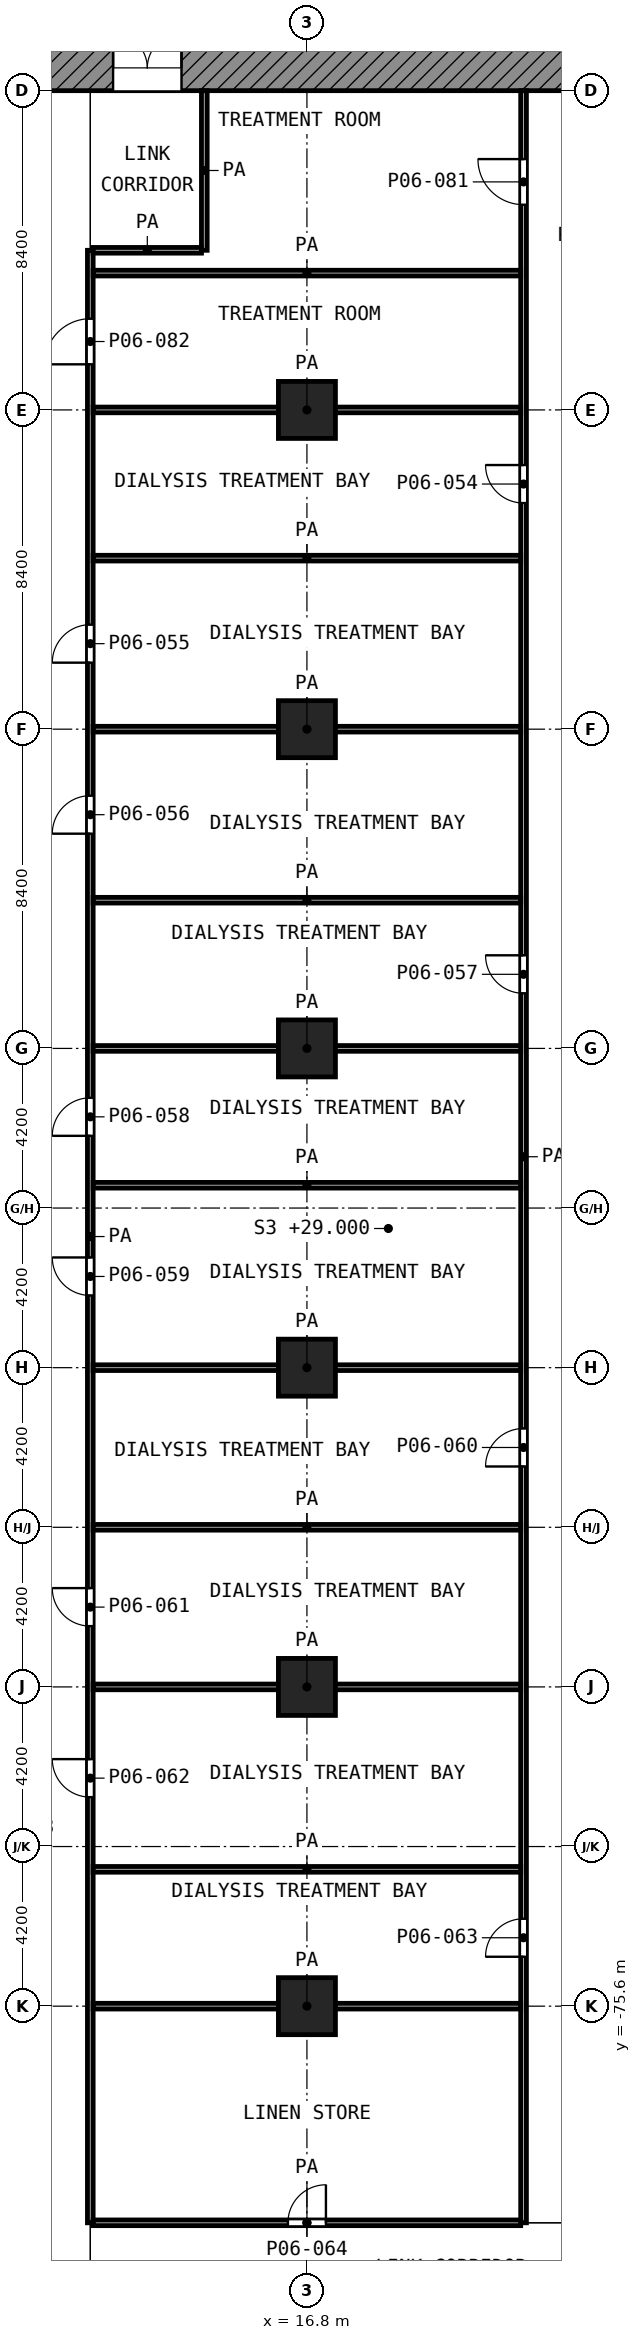
"""IFC4 building model, lengths in metres.
Left out: names, types, materials, properties, quantities, classifications, styles, units other than length and angle.
Written with IfcOpenShell. Run it as: python <this file> out.ifc"""

import sys

from ifc_helpers import new_model, si_unit, direction, frame, frame_2d, origin, origin_2d, place, context, subcontext, project, spatial, rectangle, extrude, element, fill, save


model = new_model("IFC4")
c1 = context("Model", 3, precision=1e-05, world=origin(), true_north=direction((0.0, 1.0)))
c2 = subcontext(c1, "Body", "Model", "MODEL_VIEW")
j1 = project(units=[si_unit("LENGTHUNIT", "METRE"), si_unit("PLANEANGLEUNIT", "RADIAN")], contexts=[c1])
p1 = place(None, origin())
s1 = spatial("IfcSite", under=j1, at=p1, CompositionType="ELEMENT")
p2 = place(p1, origin())
s2 = spatial("IfcBuilding", under=s1, at=p2, CompositionType="ELEMENT")
p3 = place(p2, frame((0.0, 0.0, 29.0)))
s3 = spatial("IfcBuildingStorey", under=s2, at=p3, CompositionType="ELEMENT", Elevation=29.0)
for number, where, z_axis, x_axis in (
    (1, (16.8, -33.6, 0.0), (0.0, 0.0, 1.0), (1.0, 0.0, 0.0)),
    (2, (16.8, -42.0, 0.0), (0.0, 0.0, 1.0), (1.0, 0.0, 0.0)),
    (3, (16.8, -50.4, 0.0), (0.0, 0.0, 1.0), (1.0, 0.0, 0.0)),
    (4, (16.8, -58.8, 0.0), (0.0, 0.0, 1.0), (1.0, 0.0, 0.0)),
    (5, (16.8, -67.2, 0.0), (0.0, 0.0, 1.0), (1.0, 0.0, 0.0)),
    (6, (16.8, -75.6, 0.0), (0.0, 0.0, 1.0), (1.0, 0.0, 0.0)),
):
    element("IfcColumn", number, at=place(p3, frame(where, z_axis=z_axis, x_axis=x_axis)), inside=s3, PredefinedType="COLUMN", context=c2, shape_type="SweptSolid", body=[
        extrude(rectangle(XDim=1.5, YDim=1.5, at=origin_2d()), origin(), (0.0, 0.0, 1.0), 5.2),
    ])
p4 = place(p3, frame((5.4, -24.6, 0.0), z_axis=(0.0, 0.0, 1.0), x_axis=(1.0, 0.0, 0.0)))
e7 = element("IfcWall", 7, at=p4, inside=s3, PredefinedType="SHEAR", context=c2, shape_type="SweptSolid", body=[
    extrude(rectangle(XDim=18.6, YDim=1.2, at=frame_2d((9.3, 0.0))), origin(), (0.0, 0.0, 1.0), 4.7),
])
p5 = place(p4, frame((6.3, 0.0, 0.0)))
e8 = element("IfcOpeningElement", 8, at=p5, cuts=e7, PredefinedType="OPENING", context=c2, shape_type="SweptSolid", body=[
    extrude(rectangle(XDim=1.8, YDim=2.1, at=frame_2d((0.9, 1.05))), frame((0.0, 0.61, 0.0), z_axis=(0.0, -1.0, 0.0), x_axis=(1.0, 0.0, 0.0)), (0.0, 0.0, 1.0), 1.22),
])
p6 = place(p3, frame((11.175, -81.3, 0.0), z_axis=(0.0, 0.0, 1.0), x_axis=(1.0, 0.0, 0.0)))
e9 = element("IfcWall", 9, at=p6, inside=s3, PredefinedType="PARTITIONING", context=c2, shape_type="SweptSolid", body=[
    extrude(rectangle(XDim=11.25, YDim=0.15, at=frame_2d((5.625, 0.0))), origin(), (0.0, 0.0, 1.0), 4.7),
])
p7 = place(p6, frame((5.125, 0.0, 0.0)))
e10 = element("IfcOpeningElement", 10, at=p7, cuts=e9, PredefinedType="OPENING", context=c2, shape_type="SweptSolid", body=[
    extrude(rectangle(XDim=1.0, YDim=2.1, at=frame_2d((0.5, 1.05))), frame((0.0, 0.085, 0.0), z_axis=(0.0, -1.0, 0.0), x_axis=(1.0, 0.0, 0.0)), (0.0, 0.0, 1.0), 0.17),
])
for number, where, z_axis, x_axis in (
    (11, (11.175, -75.6, 0.0), (0.0, 0.0, 1.0), (1.0, 0.0, 0.0)),
    (12, (11.175, -72.0, 0.0), (0.0, 0.0, 1.0), (1.0, 0.0, 0.0)),
    (13, (11.175, -67.2, 0.0), (0.0, 0.0, 1.0), (1.0, 0.0, 0.0)),
    (14, (11.175, -63.0, 0.0), (0.0, 0.0, 1.0), (1.0, 0.0, 0.0)),
    (15, (11.175, -58.8, 0.0), (0.0, 0.0, 1.0), (1.0, 0.0, 0.0)),
    (16, (11.175, -54.0, 0.0), (0.0, 0.0, 1.0), (1.0, 0.0, 0.0)),
    (17, (11.175, -50.4, 0.0), (0.0, 0.0, 1.0), (1.0, 0.0, 0.0)),
    (18, (11.175, -46.5, 0.0), (0.0, 0.0, 1.0), (1.0, 0.0, 0.0)),
    (19, (11.175, -42.0, 0.0), (0.0, 0.0, 1.0), (1.0, 0.0, 0.0)),
    (20, (11.175, -37.5, 0.0), (0.0, 0.0, 1.0), (1.0, 0.0, 0.0)),
    (21, (11.175, -33.6, 0.0), (0.0, 0.0, 1.0), (1.0, 0.0, 0.0)),
    (22, (11.175, -30.0, 0.0), (0.0, 0.0, 1.0), (1.0, 0.0, 0.0)),
):
    element("IfcWall", number, at=place(p3, frame(where, z_axis=z_axis, x_axis=x_axis)), inside=s3, PredefinedType="PARTITIONING", context=c2, shape_type="SweptSolid", body=[
        extrude(rectangle(XDim=11.25, YDim=0.15, at=frame_2d((5.625, 0.0))), origin(), (0.0, 0.0, 1.0), 4.7),
    ])
p8 = place(p3, frame((11.175, -29.4, 0.0), z_axis=(0.0, 0.0, 1.0), x_axis=(1.0, 0.0, 0.0)))
e23 = element("IfcWall", 23, at=p8, inside=s3, PredefinedType="PARTITIONING", context=c2, shape_type="SweptSolid", body=[
    extrude(rectangle(XDim=2.85, YDim=0.15, at=frame_2d((1.425, 0.0))), origin(), (0.0, 0.0, 1.0), 4.7),
])
p9 = place(p3, frame((11.1, -81.3, 0.0), z_axis=(0.0, 0.0, 1.0), x_axis=(0.0, 1.0, 0.0)))
e24 = element("IfcWall", 24, at=p9, inside=s3, PredefinedType="PARTITIONING", context=c2, shape_type="SweptSolid", body=[
    extrude(rectangle(XDim=51.9, YDim=0.15, at=frame_2d((25.95, 0.0))), origin(), (0.0, 0.0, 1.0), 4.7),
])
p10 = place(p9, frame((48.9, 0.0, 0.0)))
e25 = element("IfcOpeningElement", 25, at=p10, cuts=e24, PredefinedType="OPENING", context=c2, shape_type="SweptSolid", body=[
    extrude(rectangle(XDim=1.2, YDim=2.1, at=frame_2d((0.6, 1.05))), frame((0.0, 0.085, 0.0), z_axis=(0.0, -1.0, 0.0), x_axis=(1.0, 0.0, 0.0)), (0.0, 0.0, 1.0), 0.17),
])
p11 = place(p9, frame((41.05, 0.0, 0.0)))
e26 = element("IfcOpeningElement", 26, at=p11, cuts=e24, PredefinedType="OPENING", context=c2, shape_type="SweptSolid", body=[
    extrude(rectangle(XDim=1.0, YDim=2.1, at=frame_2d((0.5, 1.05))), frame((0.0, 0.085, 0.0), z_axis=(0.0, -1.0, 0.0), x_axis=(1.0, 0.0, 0.0)), (0.0, 0.0, 1.0), 0.17),
])
p12 = place(p9, frame((36.55, 0.0, 0.0)))
e27 = element("IfcOpeningElement", 27, at=p12, cuts=e24, PredefinedType="OPENING", context=c2, shape_type="SweptSolid", body=[
    extrude(rectangle(XDim=1.0, YDim=2.1, at=frame_2d((0.5, 1.05))), frame((0.0, 0.085, 0.0), z_axis=(0.0, -1.0, 0.0), x_axis=(1.0, 0.0, 0.0)), (0.0, 0.0, 1.0), 0.17),
])
p13 = place(p9, frame((28.6, 0.0, 0.0)))
e28 = element("IfcOpeningElement", 28, at=p13, cuts=e24, PredefinedType="OPENING", context=c2, shape_type="SweptSolid", body=[
    extrude(rectangle(XDim=1.0, YDim=2.1, at=frame_2d((0.5, 1.05))), frame((0.0, 0.085, 0.0), z_axis=(0.0, -1.0, 0.0), x_axis=(1.0, 0.0, 0.0)), (0.0, 0.0, 1.0), 0.17),
])
p14 = place(p9, frame((24.4, 0.0, 0.0)))
e29 = element("IfcOpeningElement", 29, at=p14, cuts=e24, PredefinedType="OPENING", context=c2, shape_type="SweptSolid", body=[
    extrude(rectangle(XDim=1.0, YDim=2.1, at=frame_2d((0.5, 1.05))), frame((0.0, 0.085, 0.0), z_axis=(0.0, -1.0, 0.0), x_axis=(1.0, 0.0, 0.0)), (0.0, 0.0, 1.0), 0.17),
])
p15 = place(p9, frame((15.7, 0.0, 0.0)))
e30 = element("IfcOpeningElement", 30, at=p15, cuts=e24, PredefinedType="OPENING", context=c2, shape_type="SweptSolid", body=[
    extrude(rectangle(XDim=1.0, YDim=2.1, at=frame_2d((0.5, 1.05))), frame((0.0, 0.085, 0.0), z_axis=(0.0, -1.0, 0.0), x_axis=(1.0, 0.0, 0.0)), (0.0, 0.0, 1.0), 0.17),
])
p16 = place(p9, frame((11.2, 0.0, 0.0)))
e31 = element("IfcOpeningElement", 31, at=p16, cuts=e24, PredefinedType="OPENING", context=c2, shape_type="SweptSolid", body=[
    extrude(rectangle(XDim=1.0, YDim=2.1, at=frame_2d((0.5, 1.05))), frame((0.0, 0.085, 0.0), z_axis=(0.0, -1.0, 0.0), x_axis=(1.0, 0.0, 0.0)), (0.0, 0.0, 1.0), 0.17),
])
p17 = place(p3, frame((14.1, -29.4, 0.0), z_axis=(0.0, 0.0, 1.0), x_axis=(0.0, 1.0, 0.0)))
e32 = element("IfcWall", 32, at=p17, inside=s3, PredefinedType="PARTITIONING", context=c2, shape_type="SweptSolid", body=[
    extrude(rectangle(XDim=4.2, YDim=0.15, at=frame_2d((2.1, 0.0))), origin(), (0.0, 0.0, 1.0), 4.7),
])
p18 = place(p3, frame((22.5, -81.3, 0.0), z_axis=(0.0, 0.0, 1.0), x_axis=(0.0, 1.0, 0.0)))
e33 = element("IfcWall", 33, at=p18, inside=s3, PredefinedType="PARTITIONING", context=c2, shape_type="SweptSolid", body=[
    extrude(rectangle(XDim=56.1, YDim=0.15, at=frame_2d((28.05, 0.0))), origin(), (0.0, 0.0, 1.0), 4.7),
])
p19 = place(p18, frame((53.1, 0.0, 0.0)))
e34 = element("IfcOpeningElement", 34, at=p19, cuts=e33, PredefinedType="OPENING", context=c2, shape_type="SweptSolid", body=[
    extrude(rectangle(XDim=1.2, YDim=2.1, at=frame_2d((0.6, 1.05))), frame((0.0, 0.085, 0.0), z_axis=(0.0, -1.0, 0.0), x_axis=(1.0, 0.0, 0.0)), (0.0, 0.0, 1.0), 0.17),
])
p20 = place(p18, frame((45.25, 0.0, 0.0)))
e35 = element("IfcOpeningElement", 35, at=p20, cuts=e33, PredefinedType="OPENING", context=c2, shape_type="SweptSolid", body=[
    extrude(rectangle(XDim=1.0, YDim=2.1, at=frame_2d((0.5, 1.05))), frame((0.0, 0.085, 0.0), z_axis=(0.0, -1.0, 0.0), x_axis=(1.0, 0.0, 0.0)), (0.0, 0.0, 1.0), 0.17),
])
p21 = place(p18, frame((32.35, 0.0, 0.0)))
e36 = element("IfcOpeningElement", 36, at=p21, cuts=e33, PredefinedType="OPENING", context=c2, shape_type="SweptSolid", body=[
    extrude(rectangle(XDim=1.0, YDim=2.1, at=frame_2d((0.5, 1.05))), frame((0.0, 0.085, 0.0), z_axis=(0.0, -1.0, 0.0), x_axis=(1.0, 0.0, 0.0)), (0.0, 0.0, 1.0), 0.17),
])
p22 = place(p18, frame((19.9, 0.0, 0.0)))
e37 = element("IfcOpeningElement", 37, at=p22, cuts=e33, PredefinedType="OPENING", context=c2, shape_type="SweptSolid", body=[
    extrude(rectangle(XDim=1.0, YDim=2.1, at=frame_2d((0.5, 1.05))), frame((0.0, 0.085, 0.0), z_axis=(0.0, -1.0, 0.0), x_axis=(1.0, 0.0, 0.0)), (0.0, 0.0, 1.0), 0.17),
])
p23 = place(p18, frame((7.0, 0.0, 0.0)))
e38 = element("IfcOpeningElement", 38, at=p23, cuts=e33, PredefinedType="OPENING", context=c2, shape_type="SweptSolid", body=[
    extrude(rectangle(XDim=1.0, YDim=2.1, at=frame_2d((0.5, 1.05))), frame((0.0, 0.085, 0.0), z_axis=(0.0, -1.0, 0.0), x_axis=(1.0, 0.0, 0.0)), (0.0, 0.0, 1.0), 0.17),
])
p24 = place(p5, origin())
e39 = element("IfcDoor", 39, at=p24, inside=s3, OperationType="DOUBLE_DOOR_SINGLE_SWING", PredefinedType="DOOR", context=c2, shape_type="SweptSolid", body=[
    extrude(rectangle(XDim=1.8, YDim=2.1, at=frame_2d((0.9, 1.05))), frame((0.0, 0.025, 0.0), z_axis=(0.0, -1.0, 0.0), x_axis=(1.0, 0.0, 0.0)), (0.0, 0.0, 1.0), 0.05),
])
fill(e8, e39)
p25 = place(p19, origin())
e40 = element("IfcDoor", 40, at=p25, inside=s3, OperationType="SINGLE_SWING_RIGHT", PredefinedType="DOOR", context=c2, shape_type="SweptSolid", body=[
    extrude(rectangle(XDim=1.2, YDim=2.1, at=frame_2d((0.6, 1.05))), frame((0.0, 0.025, 0.0), z_axis=(0.0, -1.0, 0.0), x_axis=(1.0, 0.0, 0.0)), (0.0, 0.0, 1.0), 0.05),
])
fill(e34, e40)
p26 = place(p10, origin())
e41 = element("IfcDoor", 41, at=p26, inside=s3, OperationType="SINGLE_SWING_LEFT", PredefinedType="DOOR", context=c2, shape_type="SweptSolid", body=[
    extrude(rectangle(XDim=1.2, YDim=2.1, at=frame_2d((0.6, 1.05))), frame((0.0, 0.025, 0.0), z_axis=(0.0, -1.0, 0.0), x_axis=(1.0, 0.0, 0.0)), (0.0, 0.0, 1.0), 0.05),
])
fill(e25, e41)
p27 = place(p20, origin())
e42 = element("IfcDoor", 42, at=p27, inside=s3, OperationType="SINGLE_SWING_RIGHT", PredefinedType="DOOR", context=c2, shape_type="SweptSolid", body=[
    extrude(rectangle(XDim=1.0, YDim=2.1, at=frame_2d((0.5, 1.05))), frame((0.0, 0.025, 0.0), z_axis=(0.0, -1.0, 0.0), x_axis=(1.0, 0.0, 0.0)), (0.0, 0.0, 1.0), 0.05),
])
fill(e35, e42)
p28 = place(p11, origin())
e43 = element("IfcDoor", 43, at=p28, inside=s3, OperationType="SINGLE_SWING_LEFT", PredefinedType="DOOR", context=c2, shape_type="SweptSolid", body=[
    extrude(rectangle(XDim=1.0, YDim=2.1, at=frame_2d((0.5, 1.05))), frame((0.0, 0.025, 0.0), z_axis=(0.0, -1.0, 0.0), x_axis=(1.0, 0.0, 0.0)), (0.0, 0.0, 1.0), 0.05),
])
fill(e26, e43)
p29 = place(p12, origin())
e44 = element("IfcDoor", 44, at=p29, inside=s3, OperationType="SINGLE_SWING_LEFT", PredefinedType="DOOR", context=c2, shape_type="SweptSolid", body=[
    extrude(rectangle(XDim=1.0, YDim=2.1, at=frame_2d((0.5, 1.05))), frame((0.0, 0.025, 0.0), z_axis=(0.0, -1.0, 0.0), x_axis=(1.0, 0.0, 0.0)), (0.0, 0.0, 1.0), 0.05),
])
fill(e27, e44)
p30 = place(p21, origin())
e45 = element("IfcDoor", 45, at=p30, inside=s3, OperationType="SINGLE_SWING_RIGHT", PredefinedType="DOOR", context=c2, shape_type="SweptSolid", body=[
    extrude(rectangle(XDim=1.0, YDim=2.1, at=frame_2d((0.5, 1.05))), frame((0.0, 0.025, 0.0), z_axis=(0.0, -1.0, 0.0), x_axis=(1.0, 0.0, 0.0)), (0.0, 0.0, 1.0), 0.05),
])
fill(e36, e45)
p31 = place(p13, origin())
e46 = element("IfcDoor", 46, at=p31, inside=s3, OperationType="SINGLE_SWING_LEFT", PredefinedType="DOOR", context=c2, shape_type="SweptSolid", body=[
    extrude(rectangle(XDim=1.0, YDim=2.1, at=frame_2d((0.5, 1.05))), frame((0.0, 0.025, 0.0), z_axis=(0.0, -1.0, 0.0), x_axis=(1.0, 0.0, 0.0)), (0.0, 0.0, 1.0), 0.05),
])
fill(e28, e46)
p32 = place(p14, origin())
e47 = element("IfcDoor", 47, at=p32, inside=s3, OperationType="SINGLE_SWING_RIGHT", PredefinedType="DOOR", context=c2, shape_type="SweptSolid", body=[
    extrude(rectangle(XDim=1.0, YDim=2.1, at=frame_2d((0.5, 1.05))), frame((0.0, 0.025, 0.0), z_axis=(0.0, -1.0, 0.0), x_axis=(1.0, 0.0, 0.0)), (0.0, 0.0, 1.0), 0.05),
])
fill(e29, e47)
p33 = place(p22, origin())
e48 = element("IfcDoor", 48, at=p33, inside=s3, OperationType="SINGLE_SWING_LEFT", PredefinedType="DOOR", context=c2, shape_type="SweptSolid", body=[
    extrude(rectangle(XDim=1.0, YDim=2.1, at=frame_2d((0.5, 1.05))), frame((0.0, 0.025, 0.0), z_axis=(0.0, -1.0, 0.0), x_axis=(1.0, 0.0, 0.0)), (0.0, 0.0, 1.0), 0.05),
])
fill(e37, e48)
p34 = place(p15, origin())
e49 = element("IfcDoor", 49, at=p34, inside=s3, OperationType="SINGLE_SWING_RIGHT", PredefinedType="DOOR", context=c2, shape_type="SweptSolid", body=[
    extrude(rectangle(XDim=1.0, YDim=2.1, at=frame_2d((0.5, 1.05))), frame((0.0, 0.025, 0.0), z_axis=(0.0, -1.0, 0.0), x_axis=(1.0, 0.0, 0.0)), (0.0, 0.0, 1.0), 0.05),
])
fill(e30, e49)
p35 = place(p16, origin())
e50 = element("IfcDoor", 50, at=p35, inside=s3, OperationType="SINGLE_SWING_RIGHT", PredefinedType="DOOR", context=c2, shape_type="SweptSolid", body=[
    extrude(rectangle(XDim=1.0, YDim=2.1, at=frame_2d((0.5, 1.05))), frame((0.0, 0.025, 0.0), z_axis=(0.0, -1.0, 0.0), x_axis=(1.0, 0.0, 0.0)), (0.0, 0.0, 1.0), 0.05),
])
fill(e31, e50)
p36 = place(p23, origin())
e51 = element("IfcDoor", 51, at=p36, inside=s3, OperationType="SINGLE_SWING_LEFT", PredefinedType="DOOR", context=c2, shape_type="SweptSolid", body=[
    extrude(rectangle(XDim=1.0, YDim=2.1, at=frame_2d((0.5, 1.05))), frame((0.0, 0.025, 0.0), z_axis=(0.0, -1.0, 0.0), x_axis=(1.0, 0.0, 0.0)), (0.0, 0.0, 1.0), 0.05),
])
fill(e38, e51)
p37 = place(p7, origin())
e52 = element("IfcDoor", 52, at=p37, inside=s3, OperationType="SINGLE_SWING_RIGHT", PredefinedType="DOOR", context=c2, shape_type="SweptSolid", body=[
    extrude(rectangle(XDim=1.0, YDim=2.1, at=frame_2d((0.5, 1.05))), frame((0.0, 0.025, 0.0), z_axis=(0.0, -1.0, 0.0), x_axis=(1.0, 0.0, 0.0)), (0.0, 0.0, 1.0), 0.05),
])
fill(e10, e52)
save(model, sys.argv[1])
